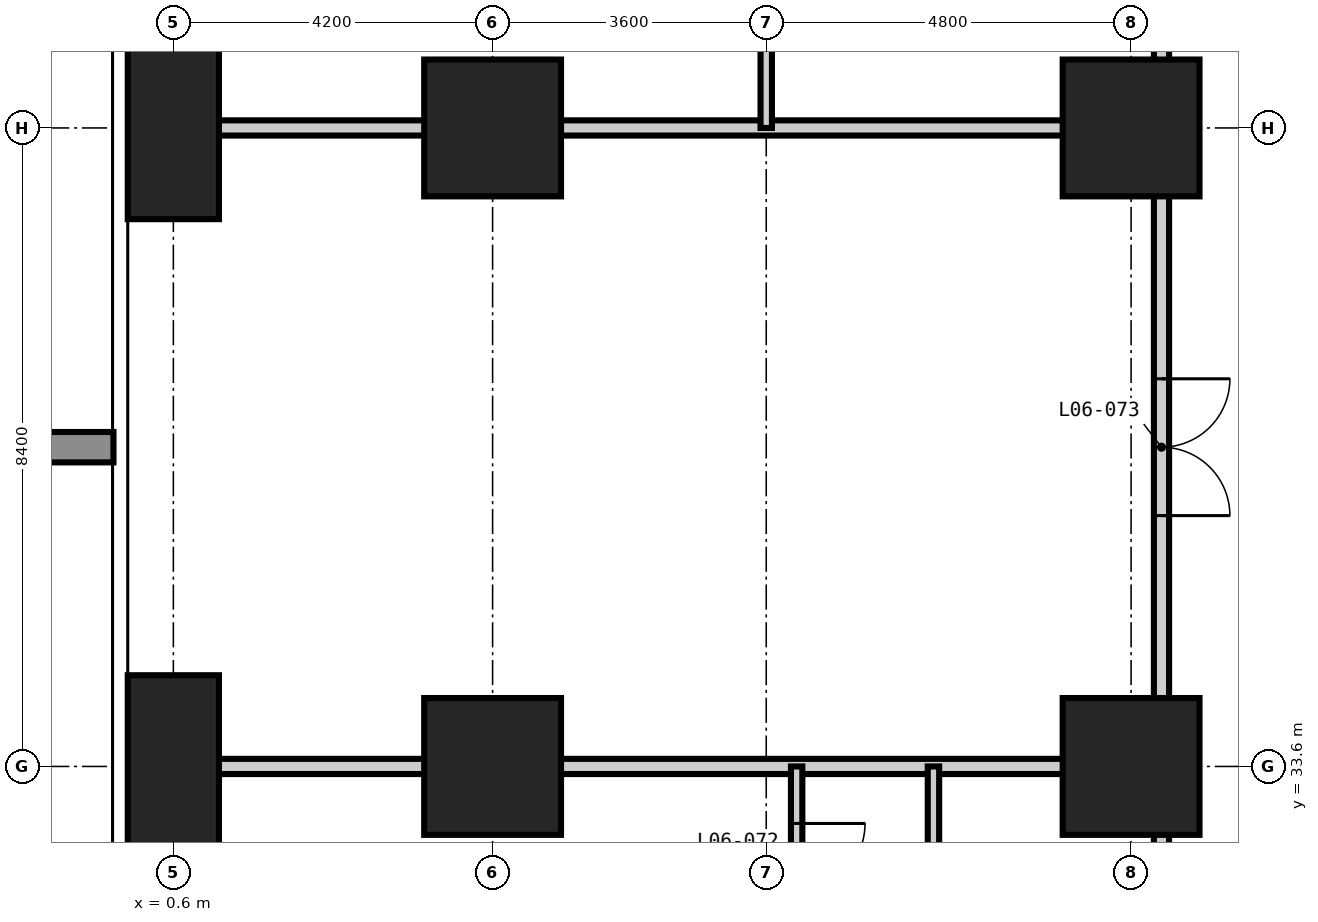
"""IFC4 building model, lengths in metres.
Left out: names, types, materials, properties, quantities, classifications, styles, units other than length and angle.
Written with IfcOpenShell. Run it as: python <this file> out.ifc"""

import sys

from ifc_helpers import new_model, si_unit, direction, frame, frame_2d, origin, origin_2d, place, context, subcontext, project, spatial, rectangle, extrude, element, fill, save


model = new_model("IFC4")
c1 = context("Model", 3, precision=1e-05, world=origin(), true_north=direction((0.0, 1.0)))
c2 = subcontext(c1, "Body", "Model", "MODEL_VIEW")
j1 = project(units=[si_unit("LENGTHUNIT", "METRE"), si_unit("PLANEANGLEUNIT", "RADIAN")], contexts=[c1])
p1 = place(None, origin())
s1 = spatial("IfcSite", under=j1, at=p1, CompositionType="ELEMENT")
p2 = place(p1, origin())
s2 = spatial("IfcBuilding", under=s1, at=p2, CompositionType="ELEMENT")
p3 = place(p2, frame((0.0, 0.0, 30.6)))
s3 = spatial("IfcBuildingStorey", under=s2, at=p3, CompositionType="ELEMENT", Elevation=30.6)
for number, where, z_axis, x_axis in (
    (1, (0.6, 33.6, -0.35), (0.0, 0.0, 1.0), (1.0, 0.0, 0.0)),
    (2, (0.6, 42.0, -0.35), (0.0, 0.0, 1.0), (1.0, 0.0, 0.0)),
):
    element("IfcColumn", number, at=place(p3, frame(where, z_axis=z_axis, x_axis=x_axis)), inside=s3, PredefinedType="COLUMN", context=c2, shape_type="SweptSolid", body=[
        extrude(rectangle(XDim=1.2, YDim=2.4, at=origin_2d()), origin(), (0.0, 0.0, 1.0), 3.6),
    ])
for number, where, z_axis, x_axis in (
    (3, (4.8, 33.6, -0.35), (0.0, 0.0, 1.0), (1.0, 0.0, 0.0)),
    (4, (4.8, 42.0, -0.35), (0.0, 0.0, 1.0), (1.0, 0.0, 0.0)),
    (5, (13.2, 33.6, -0.35), (0.0, 0.0, 1.0), (1.0, 0.0, 0.0)),
    (6, (13.2, 42.0, -0.35), (0.0, 0.0, 1.0), (1.0, 0.0, 0.0)),
):
    element("IfcColumn", number, at=place(p3, frame(where, z_axis=z_axis, x_axis=x_axis)), inside=s3, PredefinedType="COLUMN", context=c2, shape_type="SweptSolid", body=[
        extrude(rectangle(XDim=1.8, YDim=1.8, at=origin_2d()), origin(), (0.0, 0.0, 1.0), 3.6),
    ])
p4 = place(p3, frame((13.6, 13.6, 0.0), z_axis=(0.0, 0.0, 1.0), x_axis=(0.0, 1.0, 0.0)))
e7 = element("IfcWall", 7, at=p4, inside=s3, PredefinedType="PARTITIONING", context=c2, shape_type="SweptSolid", body=[
    extrude(rectangle(XDim=20.0, YDim=0.2, at=frame_2d((10.0, 0.0))), origin(), (0.0, 0.0, 1.0), 3.25),
])
p5 = place(p4, frame((6.0, 0.0, 0.0)))
e8 = element("IfcOpeningElement", 8, at=p5, cuts=e7, PredefinedType="OPENING", context=c2, shape_type="SweptSolid", body=[
    extrude(rectangle(XDim=1.0, YDim=2.2, at=frame_2d((0.5, 1.1))), frame((0.0, 0.11, 0.0), z_axis=(0.0, -1.0, 0.0), x_axis=(1.0, 0.0, 0.0)), (0.0, 0.0, 1.0), 0.22),
])
p6 = place(p4, frame((7.8, 0.0, 0.0)))
e9 = element("IfcOpeningElement", 9, at=p6, cuts=e7, PredefinedType="OPENING", context=c2, shape_type="SweptSolid", body=[
    extrude(rectangle(XDim=1.0, YDim=2.2, at=frame_2d((0.5, 1.1))), frame((0.0, 0.11, 0.0), z_axis=(0.0, -1.0, 0.0), x_axis=(1.0, 0.0, 0.0)), (0.0, 0.0, 1.0), 0.22),
])
p7 = place(p4, frame((14.4, 0.0, 0.0)))
e10 = element("IfcOpeningElement", 10, at=p7, cuts=e7, PredefinedType="OPENING", context=c2, shape_type="SweptSolid", body=[
    extrude(rectangle(XDim=1.0, YDim=2.2, at=frame_2d((0.5, 1.1))), frame((0.0, 0.11, 0.0), z_axis=(0.0, -1.0, 0.0), x_axis=(1.0, 0.0, 0.0)), (0.0, 0.0, 1.0), 0.22),
])
p8 = place(p4, frame((16.2, 0.0, 0.0)))
e11 = element("IfcOpeningElement", 11, at=p8, cuts=e7, PredefinedType="OPENING", context=c2, shape_type="SweptSolid", body=[
    extrude(rectangle(XDim=1.0, YDim=2.2, at=frame_2d((0.5, 1.1))), frame((0.0, 0.11, 0.0), z_axis=(0.0, -1.0, 0.0), x_axis=(1.0, 0.0, 0.0)), (0.0, 0.0, 1.0), 0.22),
])
p9 = place(p4, frame((1.1, 0.0, 0.0)))
e12 = element("IfcOpeningElement", 12, at=p9, cuts=e7, PredefinedType="OPENING", context=c2, shape_type="SweptSolid", body=[
    extrude(rectangle(XDim=1.0, YDim=2.2, at=frame_2d((0.5, 1.1))), frame((0.0, 0.11, 0.0), z_axis=(0.0, -1.0, 0.0), x_axis=(1.0, 0.0, 0.0)), (0.0, 0.0, 1.0), 0.22),
])
p10 = place(p3, frame((13.6, 42.0, 0.0), z_axis=(0.0, 0.0, 1.0), x_axis=(0.0, 1.0, 0.0)))
e13 = element("IfcWall", 13, at=p10, inside=s3, PredefinedType="PARTITIONING", context=c2, shape_type="SweptSolid", body=[
    extrude(rectangle(XDim=3.8, YDim=0.2, at=frame_2d((1.9, 0.0))), origin(), (0.0, 0.0, 1.0), 3.25),
])
p11 = place(p10, frame((1.4, 0.0, 0.0)))
e14 = element("IfcOpeningElement", 14, at=p11, cuts=e13, PredefinedType="OPENING", context=c2, shape_type="SweptSolid", body=[
    extrude(rectangle(XDim=1.0, YDim=2.2, at=frame_2d((0.5, 1.1))), frame((0.0, 0.11, 0.0), z_axis=(0.0, -1.0, 0.0), x_axis=(1.0, 0.0, 0.0)), (0.0, 0.0, 1.0), 0.22),
])
p12 = place(p3, frame((13.6, 42.0, 0.0), z_axis=(0.0, 0.0, 1.0), x_axis=(0.0, -1.0, 0.0)))
e15 = element("IfcWall", 15, at=p12, inside=s3, PredefinedType="PARTITIONING", context=c2, shape_type="SweptSolid", body=[
    extrude(rectangle(XDim=8.4, YDim=0.2, at=frame_2d((4.2, 0.0))), origin(), (0.0, 0.0, 1.0), 3.25),
])
p13 = place(p12, frame((3.3, 0.0, 0.0)))
e16 = element("IfcOpeningElement", 16, at=p13, cuts=e15, PredefinedType="OPENING", context=c2, shape_type="SweptSolid", body=[
    extrude(rectangle(XDim=1.8, YDim=2.4, at=frame_2d((0.9, 1.2))), frame((0.0, 0.11, 0.0), z_axis=(0.0, -1.0, 0.0), x_axis=(1.0, 0.0, 0.0)), (0.0, 0.0, 1.0), 0.22),
])
for number, where, z_axis, x_axis in (
    (17, (-0.008, 33.6, 0.0), (0.0, 0.0, 1.0), (1.0, 0.0, 0.0)),
    (18, (-0.008, 42.0, 0.0), (0.0, 0.0, 1.0), (1.0, 0.0, 0.0)),
):
    element("IfcWall", number, at=place(p3, frame(where, z_axis=z_axis, x_axis=x_axis)), inside=s3, PredefinedType="PARTITIONING", context=c2, shape_type="SweptSolid", body=[
        extrude(rectangle(XDim=13.608, YDim=0.2, at=frame_2d((6.804, 0.0))), origin(), (0.0, 0.0, 1.0), 3.25),
    ])
p14 = place(p3, frame((8.4, 42.0, 0.0), z_axis=(0.0, 0.0, 1.0), x_axis=(0.0, 1.0, 0.0)))
e19 = element("IfcWall", 19, at=p14, inside=s3, PredefinedType="PARTITIONING", context=c2, shape_type="SweptSolid", body=[
    extrude(rectangle(XDim=16.808, YDim=0.15, at=frame_2d((8.404, 0.0))), origin(), (0.0, 0.0, 1.0), 3.25),
])
p15 = place(p14, frame((13.95, 0.0, 0.0)))
e20 = element("IfcOpeningElement", 20, at=p15, cuts=e19, PredefinedType="OPENING", context=c2, shape_type="SweptSolid", body=[
    extrude(rectangle(XDim=0.9, YDim=2.1, at=frame_2d((0.45, 1.05))), frame((0.0, 0.085, 0.0), z_axis=(0.0, -1.0, 0.0), x_axis=(1.0, 0.0, 0.0)), (0.0, 0.0, 1.0), 0.17),
])
p16 = place(p14, frame((3.75, 0.0, 0.0)))
e21 = element("IfcOpeningElement", 21, at=p16, cuts=e19, PredefinedType="OPENING", context=c2, shape_type="SweptSolid", body=[
    extrude(rectangle(XDim=0.9, YDim=2.1, at=frame_2d((0.45, 1.05))), frame((0.0, 0.085, 0.0), z_axis=(0.0, -1.0, 0.0), x_axis=(1.0, 0.0, 0.0)), (0.0, 0.0, 1.0), 0.17),
])
p17 = place(p3, frame((8.8, 31.2, 0.0), z_axis=(0.0, 0.0, 1.0), x_axis=(0.0, 1.0, 0.0)))
e22 = element("IfcWall", 22, at=p17, inside=s3, PredefinedType="PARTITIONING", context=c2, shape_type="SweptSolid", body=[
    extrude(rectangle(XDim=2.4, YDim=0.15, at=frame_2d((1.2, 0.0))), origin(), (0.0, 0.0, 1.0), 3.25),
])
p18 = place(p17, frame((0.75, 0.0, 0.0)))
e23 = element("IfcOpeningElement", 23, at=p18, cuts=e22, PredefinedType="OPENING", context=c2, shape_type="SweptSolid", body=[
    extrude(rectangle(XDim=0.9, YDim=2.1, at=frame_2d((0.45, 1.05))), frame((0.0, 0.085, 0.0), z_axis=(0.0, -1.0, 0.0), x_axis=(1.0, 0.0, 0.0)), (0.0, 0.0, 1.0), 0.17),
])
p19 = place(p3, frame((10.6, 31.2, 0.0), z_axis=(0.0, 0.0, 1.0), x_axis=(0.0, 1.0, 0.0)))
e24 = element("IfcWall", 24, at=p19, inside=s3, PredefinedType="PARTITIONING", context=c2, shape_type="SweptSolid", body=[
    extrude(rectangle(XDim=2.4, YDim=0.15, at=frame_2d((1.2, 0.0))), origin(), (0.0, 0.0, 1.0), 3.25),
])
p20 = place(p18, frame((0.9, 0.0, 0.0), z_axis=(0.0, 0.0, 1.0), x_axis=(-1.0, 0.0, 0.0)))
e25 = element("IfcDoor", 25, at=p20, inside=s3, OperationType="SINGLE_SWING_LEFT", PredefinedType="DOOR", context=c2, shape_type="SweptSolid", body=[
    extrude(rectangle(XDim=0.9, YDim=2.1, at=frame_2d((0.45, 1.05))), frame((0.0, 0.025, 0.0), z_axis=(0.0, -1.0, 0.0), x_axis=(1.0, 0.0, 0.0)), (0.0, 0.0, 1.0), 0.05),
])
fill(e23, e25)
p21 = place(p13, origin())
e26 = element("IfcDoor", 26, at=p21, inside=s3, OperationType="DOUBLE_DOOR_DOUBLE_SWING", PredefinedType="DOOR", context=c2, shape_type="SweptSolid", body=[
    extrude(rectangle(XDim=1.8, YDim=2.4, at=frame_2d((0.9, 1.2))), frame((0.0, 0.025, 0.0), z_axis=(0.0, -1.0, 0.0), x_axis=(1.0, 0.0, 0.0)), (0.0, 0.0, 1.0), 0.05),
])
fill(e16, e26)
save(model, sys.argv[1])
